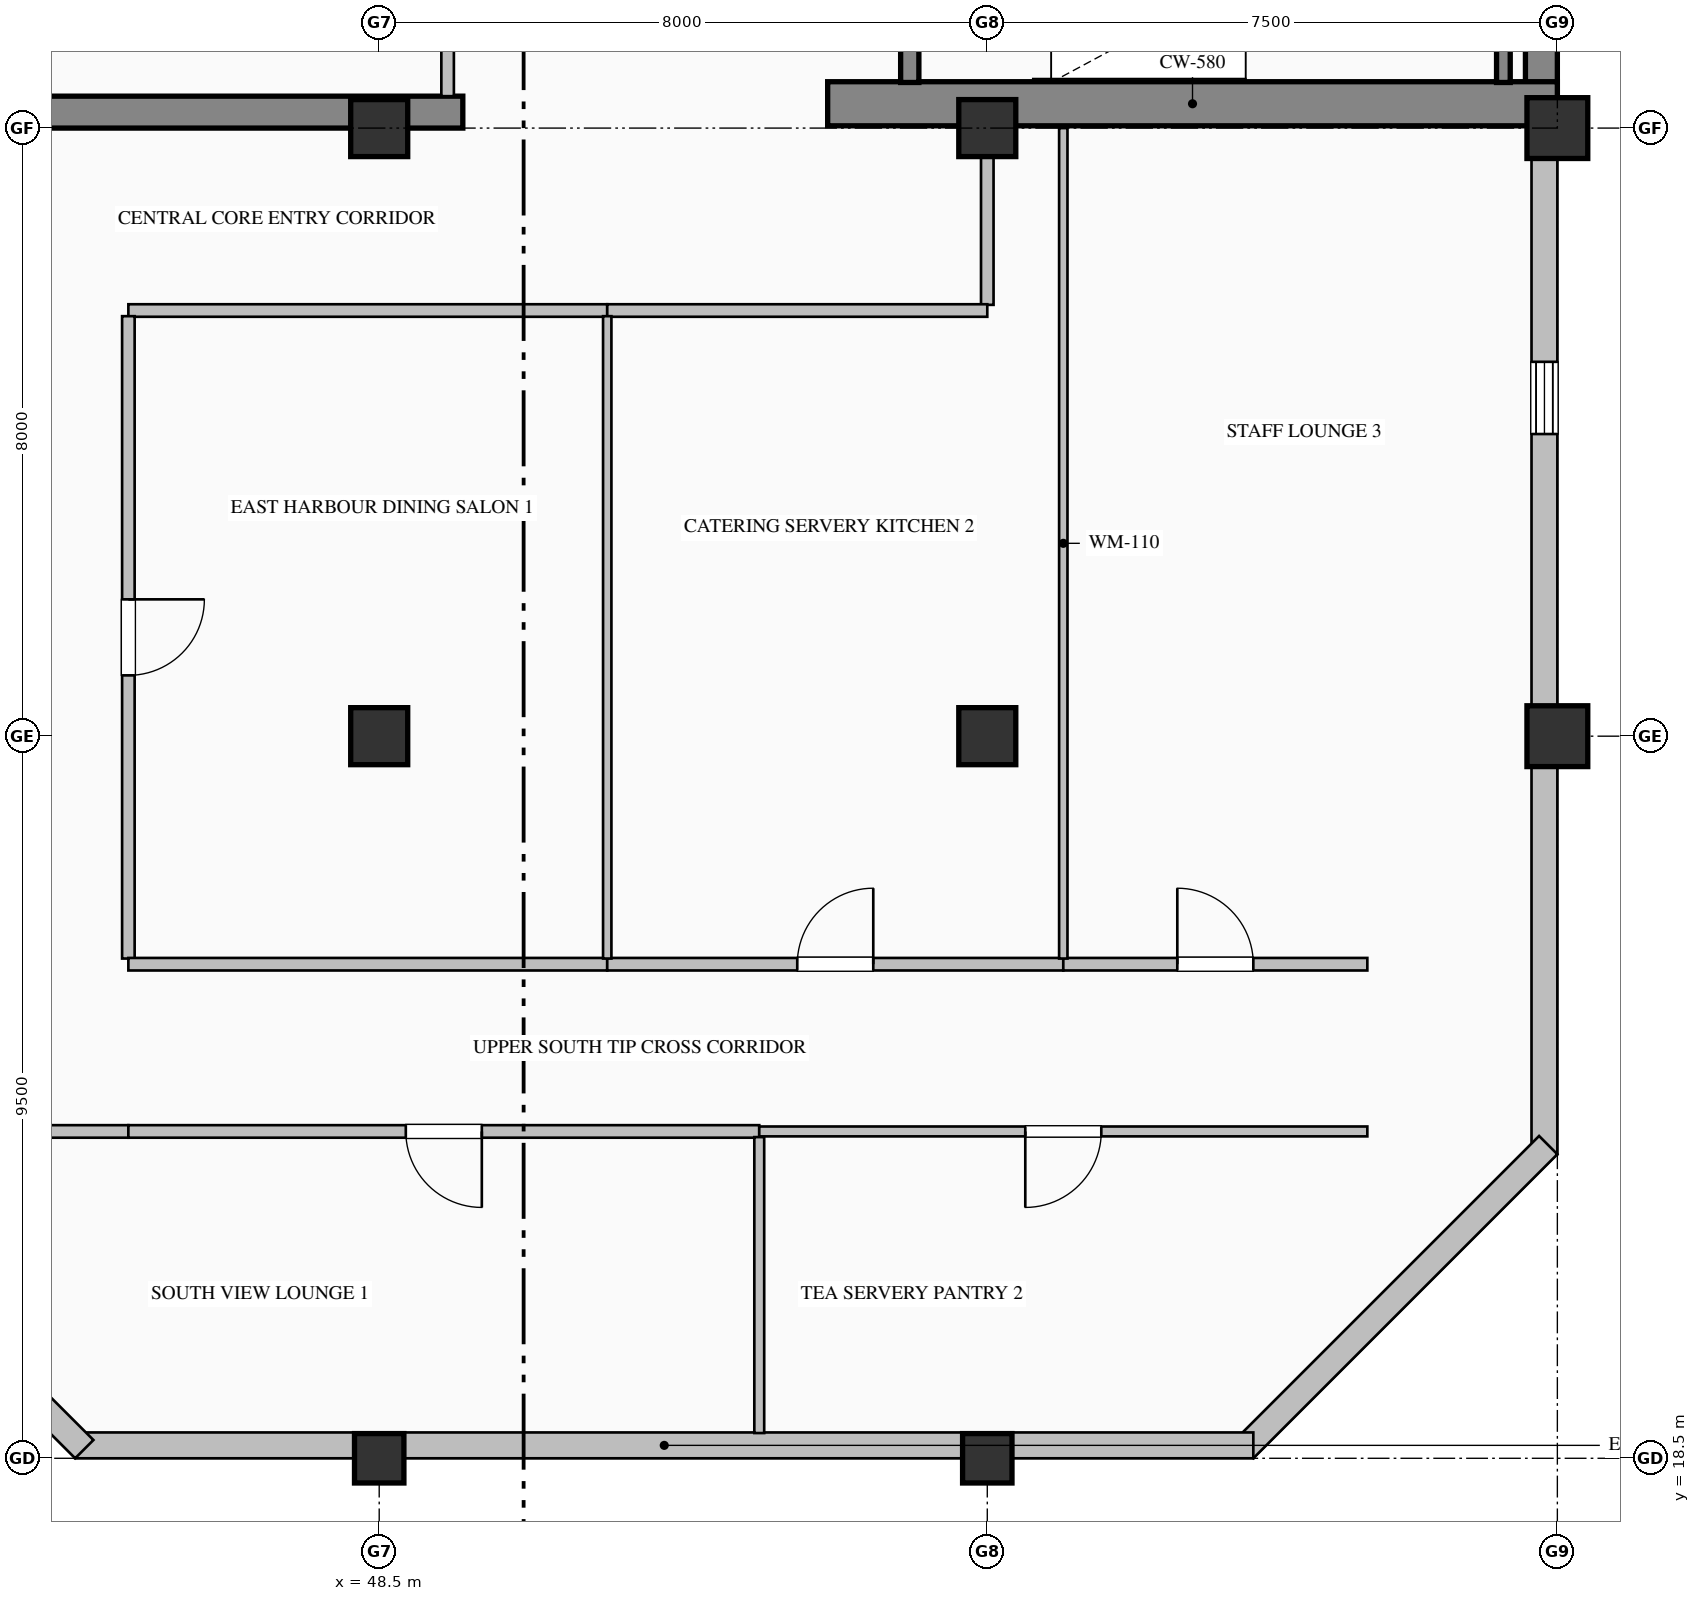
"""IFC4 building model, lengths in metres.
Left out: names, types, materials, properties, quantities, classifications, styles, units other than length and angle.
Written with IfcOpenShell. Run it as: python <this file> out.ifc"""

import sys

from ifc_helpers import new_model, si_unit, direction, frame, frame_2d, origin, origin_2d, place, context, subcontext, project, spatial, rectangle, hollow_rectangle, extrude, element, fill, save


model = new_model("IFC4")
c1 = context("Model", 3, precision=1e-05, world=origin(), true_north=direction((0.0, 1.0)))
c2 = subcontext(c1, "Body", "Model", "MODEL_VIEW")
j1 = project(units=[si_unit("LENGTHUNIT", "METRE"), si_unit("PLANEANGLEUNIT", "RADIAN")], contexts=[c1])
p1 = place(None, origin())
s1 = spatial("IfcSite", under=j1, at=p1, CompositionType="ELEMENT")
p2 = place(p1, origin())
s2 = spatial("IfcBuilding", under=s1, at=p2, CompositionType="ELEMENT")
p3 = place(p2, frame((0.0, 0.0, 335.2)))
s3 = spatial("IfcBuildingStorey", under=s2, at=p3, CompositionType="ELEMENT", Elevation=335.2)
p4 = place(p3, frame((63.79, 36.32, 0.0), z_axis=(0.0, 0.0, 1.0), x_axis=(0.0, 1.0, 0.0)))
e1 = element("IfcWall", 1, at=p4, inside=s3, PredefinedType="SHEAR", context=c2, shape_type="SweptSolid", body=[
    extrude(rectangle(XDim=15.26, YDim=0.42, at=frame_2d((7.63, 0.0))), origin(), (0.0, 0.0, 1.0), 3.785),
])
p5 = place(p3, frame((40.5, 36.21, 0.0), z_axis=(0.0, 0.0, 1.0), x_axis=(1.0, 0.0, 0.0)))
e2 = element("IfcWall", 2, at=p5, inside=s3, PredefinedType="SHEAR", context=c2, shape_type="SweptSolid", body=[
    extrude(rectangle(XDim=9.1, YDim=0.42, at=frame_2d((4.55, 0.0))), origin(), (0.0, 0.0, 1.0), 3.785),
])
p6 = place(p3, frame((54.4, 36.32, 0.0), z_axis=(0.0, 0.0, 1.0), x_axis=(1.0, 0.0, 0.0)))
e3 = element("IfcWall", 3, at=p6, inside=s3, PredefinedType="SHEAR", context=c2, shape_type="SweptSolid", body=[
    extrude(rectangle(XDim=9.6, YDim=0.58, at=frame_2d((4.8, 0.0))), origin(), (0.0, 0.0, 1.0), 4.0),
])
p7 = place(p3, frame((48.5, 18.5, 0.0), z_axis=(0.0, 0.0, 1.0), x_axis=(1.0, 0.0, 0.0)))
e4 = element("IfcColumn", 4, at=p7, inside=s3, PredefinedType="COLUMN", context=c2, shape_type="SweptSolid", body=[
    extrude(hollow_rectangle(XDim=0.65, YDim=0.65, WallThickness=0.028, at=origin_2d()), origin(), (0.0, 0.0, 1.0), 4.0),
])
for number, where, z_axis, x_axis in (
    (5, (48.5, 28.0, 0.0), (0.0, 0.0, 1.0), (1.0, 0.0, 0.0)),
    (6, (48.5, 36.0, 0.0), (0.0, 0.0, 1.0), (1.0, 0.0, 0.0)),
):
    element("IfcColumn", number, at=place(p3, frame(where, z_axis=z_axis, x_axis=x_axis)), inside=s3, PredefinedType="COLUMN", context=c2, shape_type="SweptSolid", body=[
        extrude(rectangle(XDim=0.75, YDim=0.75, at=origin_2d()), origin(), (0.0, 0.0, 1.0), 4.0),
    ])
p8 = place(p3, frame((56.5, 18.5, 0.0), z_axis=(0.0, 0.0, 1.0), x_axis=(1.0, 0.0, 0.0)))
e7 = element("IfcColumn", 7, at=p8, inside=s3, PredefinedType="COLUMN", context=c2, shape_type="SweptSolid", body=[
    extrude(hollow_rectangle(XDim=0.65, YDim=0.65, WallThickness=0.028, at=origin_2d()), origin(), (0.0, 0.0, 1.0), 4.0),
])
for number, where, z_axis, x_axis in (
    (8, (56.5, 28.0, 0.0), (0.0, 0.0, 1.0), (1.0, 0.0, 0.0)),
    (9, (56.5, 36.0, 0.0), (0.0, 0.0, 1.0), (1.0, 0.0, 0.0)),
):
    element("IfcColumn", number, at=place(p3, frame(where, z_axis=z_axis, x_axis=x_axis)), inside=s3, PredefinedType="COLUMN", context=c2, shape_type="SweptSolid", body=[
        extrude(rectangle(XDim=0.75, YDim=0.75, at=origin_2d()), origin(), (0.0, 0.0, 1.0), 4.0),
    ])
for number, where, z_axis, x_axis in (
    (10, (64.0, 28.0, 0.0), (0.0, 0.0, 1.0), (1.0, 0.0, 0.0)),
    (11, (64.0, 36.0, 0.0), (0.0, 0.0, 1.0), (1.0, 0.0, 0.0)),
):
    element("IfcColumn", number, at=place(p3, frame(where, z_axis=z_axis, x_axis=x_axis)), inside=s3, PredefinedType="COLUMN", context=c2, shape_type="SweptSolid", body=[
        extrude(hollow_rectangle(XDim=0.8, YDim=0.8, WallThickness=0.032, at=origin_2d()), origin(), (0.0, 0.0, 1.0), 4.0),
    ])
p9 = place(p3, frame((63.83, 36.05, 0.0), z_axis=(0.0, 0.0, 1.0), x_axis=(0.0, -1.0, 0.0)))
e12 = element("IfcWall", 12, at=p9, inside=s3, PredefinedType="SOLIDWALL", context=c2, shape_type="SweptSolid", body=[
    extrude(rectangle(XDim=13.55, YDim=0.34, at=frame_2d((6.775, 0.0))), origin(), (0.0, 0.0, 1.0), 3.335),
])
p10 = place(p9, frame((3.125, 0.0, 0.9)))
e13 = element("IfcOpeningElement", 13, at=p10, cuts=e12, PredefinedType="OPENING", context=c2, shape_type="SweptSolid", body=[
    extrude(rectangle(XDim=0.95, YDim=1.85, at=frame_2d((0.475, 0.925))), frame((0.0, 0.18, 0.0), z_axis=(0.0, -1.0, 0.0), x_axis=(1.0, 0.0, 0.0)), (0.0, 0.0, 1.0), 0.36),
])
p11 = place(p3, frame((63.88, 22.62, 0.0), z_axis=(0.0, 0.0, 1.0), x_axis=(-0.707106781187, -0.707106781187, 0.0)))
e14 = element("IfcWall", 14, at=p11, inside=s3, PredefinedType="SOLIDWALL", context=c2, shape_type="SweptSolid", body=[
    extrude(rectangle(XDim=5.657, YDim=0.34, at=frame_2d((2.828, 0.0))), origin(), (0.0, 0.0, 1.0), 3.785),
])
p12 = place(p3, frame((60.0, 18.67, 0.0), z_axis=(0.0, 0.0, 1.0), x_axis=(-1.0, 0.0, 0.0)))
e15 = element("IfcWall", 15, at=p12, inside=s3, PredefinedType="SOLIDWALL", context=c2, shape_type="SweptSolid", body=[
    extrude(rectangle(XDim=15.5, YDim=0.34, at=frame_2d((7.75, 0.0))), origin(), (0.0, 0.0, 1.0), 3.335),
])
p13 = place(p3, frame((44.62, 18.62, 0.0), z_axis=(0.0, 0.0, 1.0), x_axis=(-0.707106781187, 0.707106781187, 0.0)))
e16 = element("IfcWall", 16, at=p13, inside=s3, PredefinedType="SOLIDWALL", context=c2, shape_type="SweptSolid", body=[
    extrude(rectangle(XDim=5.657, YDim=0.34, at=frame_2d((2.828, 0.0))), origin(), (0.0, 0.0, 1.0), 3.785),
])
p14 = place(p3, frame((55.48, 39.75, 0.0), z_axis=(0.0, 0.0, 1.0), x_axis=(0.0, -1.0, 0.0)))
e17 = element("IfcWall", 17, at=p14, inside=s3, PredefinedType="SOLIDWALL", context=c2, shape_type="SweptSolid", body=[
    extrude(rectangle(XDim=3.15, YDim=0.24, at=frame_2d((1.575, 0.0))), origin(), (0.0, 0.0, 1.0), 4.0),
])
p15 = place(p14, frame((1.0, 0.0, 0.0)))
e18 = element("IfcOpeningElement", 18, at=p15, cuts=e17, PredefinedType="OPENING", context=c2, shape_type="SweptSolid", body=[
    extrude(rectangle(XDim=1.15, YDim=2.2, at=frame_2d((0.575, 1.1))), frame((0.0, 0.13, 0.0), z_axis=(0.0, -1.0, 0.0), x_axis=(1.0, 0.0, 0.0)), (0.0, 0.0, 1.0), 0.26),
])
p16 = place(p3, frame((63.29, 36.6, 0.0), z_axis=(0.0, 0.0, 1.0), x_axis=(0.0, 1.0, 0.0)))
e19 = element("IfcWall", 19, at=p16, inside=s3, PredefinedType="SOLIDWALL", context=c2, shape_type="SweptSolid", body=[
    extrude(rectangle(XDim=3.15, YDim=0.18, at=frame_2d((1.575, 0.0))), origin(), (0.0, 0.0, 1.0), 4.0),
])
p17 = place(p3, frame((49.4, 36.42, 0.0), z_axis=(0.0, 0.0, 1.0), x_axis=(0.0, 1.0, 0.0)))
e20 = element("IfcWall", 20, at=p17, inside=s3, PredefinedType="PARTITIONING", context=c2, shape_type="SweptSolid", body=[
    extrude(rectangle(XDim=3.893, YDim=0.165, at=frame_2d((1.947, 0.0))), origin(), (0.0, 0.0, 1.0), 3.027),
])
p18 = place(p17, frame((1.497, 0.0, 0.0)))
e21 = element("IfcOpeningElement", 21, at=p18, cuts=e20, PredefinedType="OPENING", context=c2, shape_type="SweptSolid", body=[
    extrude(rectangle(XDim=0.9, YDim=2.15, at=frame_2d((0.45, 1.075))), frame((0.0, 0.093, 0.0), z_axis=(0.0, -1.0, 0.0), x_axis=(1.0, 0.0, 0.0)), (0.0, 0.0, 1.0), 0.185),
])
p19 = place(p3, frame((51.5, 33.6, 0.0), z_axis=(0.0, 0.0, 1.0), x_axis=(-1.0, 0.0, 0.0)))
e22 = element("IfcWall", 22, at=p19, inside=s3, PredefinedType="PARTITIONING", context=c2, shape_type="SweptSolid", body=[
    extrude(rectangle(XDim=6.3, YDim=0.165, at=frame_2d((3.15, 0.0))), origin(), (0.0, 0.0, 1.0), 3.785),
])
p20 = place(p3, frame((56.5, 36.0, 0.0), z_axis=(0.0, 0.0, 1.0), x_axis=(0.0, -1.0, 0.0)))
e23 = element("IfcWall", 23, at=p20, inside=s3, PredefinedType="PARTITIONING", context=c2, shape_type="SweptSolid", body=[
    extrude(rectangle(XDim=2.325, YDim=0.165, at=frame_2d((1.163, 0.0))), origin(), (0.0, 0.0, 1.0), 3.177),
])
p21 = place(p3, frame((56.5, 33.6, 0.0), z_axis=(0.0, 0.0, 1.0), x_axis=(-1.0, 0.0, 0.0)))
e24 = element("IfcWall", 24, at=p21, inside=s3, PredefinedType="PARTITIONING", context=c2, shape_type="SweptSolid", body=[
    extrude(rectangle(XDim=5.0, YDim=0.165, at=frame_2d((2.5, 0.0))), origin(), (0.0, 0.0, 1.0), 3.785),
])
p22 = place(p3, frame((45.2, 33.525, 0.0), z_axis=(0.0, 0.0, 1.0), x_axis=(0.0, -1.0, 0.0)))
e25 = element("IfcWall", 25, at=p22, inside=s3, PredefinedType="PARTITIONING", context=c2, shape_type="SweptSolid", body=[
    extrude(rectangle(XDim=8.451, YDim=0.165, at=frame_2d((4.226, 0.0))), origin(), (0.0, 0.0, 1.0), 3.785),
])
p23 = place(p22, frame((3.726, 0.0, 0.0)))
e26 = element("IfcOpeningElement", 26, at=p23, cuts=e25, PredefinedType="OPENING", context=c2, shape_type="SweptSolid", body=[
    extrude(rectangle(XDim=1.0, YDim=2.15, at=frame_2d((0.5, 1.075))), frame((0.0, 0.093, 0.0), z_axis=(0.0, -1.0, 0.0), x_axis=(1.0, 0.0, 0.0)), (0.0, 0.0, 1.0), 0.185),
])
p24 = place(p3, frame((45.2, 22.8, 0.0), z_axis=(0.0, 0.0, 1.0), x_axis=(-1.0, 0.0, 0.0)))
e27 = element("IfcWall", 27, at=p24, inside=s3, PredefinedType="PARTITIONING", context=c2, shape_type="SweptSolid", body=[
    extrude(rectangle(XDim=2.2, YDim=0.165, at=frame_2d((1.1, 0.0))), origin(), (0.0, 0.0, 1.0), 3.785),
])
p25 = place(p3, frame((45.2, 25.0, 0.0), z_axis=(0.0, 0.0, 1.0), x_axis=(1.0, 0.0, 0.0)))
e28 = element("IfcWall", 28, at=p25, inside=s3, PredefinedType="PARTITIONING", context=c2, shape_type="SweptSolid", body=[
    extrude(rectangle(XDim=6.3, YDim=0.165, at=frame_2d((3.15, 0.0))), origin(), (0.0, 0.0, 1.0), 3.785),
])
p26 = place(p3, frame((51.5, 25.0, 0.0), z_axis=(0.0, 0.0, 1.0), x_axis=(1.0, 0.0, 0.0)))
e29 = element("IfcWall", 29, at=p26, inside=s3, PredefinedType="PARTITIONING", context=c2, shape_type="SweptSolid", body=[
    extrude(rectangle(XDim=6.0, YDim=0.165, at=frame_2d((3.0, 0.0))), origin(), (0.0, 0.0, 1.0), 3.785),
])
p27 = place(p26, frame((2.5, 0.0, 0.0)))
e30 = element("IfcOpeningElement", 30, at=p27, cuts=e29, PredefinedType="OPENING", context=c2, shape_type="SweptSolid", body=[
    extrude(rectangle(XDim=1.0, YDim=2.15, at=frame_2d((0.5, 1.075))), frame((0.0, 0.093, 0.0), z_axis=(0.0, -1.0, 0.0), x_axis=(1.0, 0.0, 0.0)), (0.0, 0.0, 1.0), 0.185),
])
p28 = place(p3, frame((57.5, 25.0, 0.0), z_axis=(0.0, 0.0, 1.0), x_axis=(1.0, 0.0, 0.0)))
e31 = element("IfcWall", 31, at=p28, inside=s3, PredefinedType="PARTITIONING", context=c2, shape_type="SweptSolid", body=[
    extrude(rectangle(XDim=4.0, YDim=0.165, at=frame_2d((2.0, 0.0))), origin(), (0.0, 0.0, 1.0), 3.785),
])
p29 = place(p28, frame((1.5, 0.0, 0.0)))
e32 = element("IfcOpeningElement", 32, at=p29, cuts=e31, PredefinedType="OPENING", context=c2, shape_type="SweptSolid", body=[
    extrude(rectangle(XDim=1.0, YDim=2.15, at=frame_2d((0.5, 1.075))), frame((0.0, 0.093, 0.0), z_axis=(0.0, -1.0, 0.0), x_axis=(1.0, 0.0, 0.0)), (0.0, 0.0, 1.0), 0.185),
])
p30 = place(p3, frame((53.5, 22.8, 0.0), z_axis=(0.0, 0.0, 1.0), x_axis=(-1.0, 0.0, 0.0)))
e33 = element("IfcWall", 33, at=p30, inside=s3, PredefinedType="PARTITIONING", context=c2, shape_type="SweptSolid", body=[
    extrude(rectangle(XDim=8.3, YDim=0.165, at=frame_2d((4.15, 0.0))), origin(), (0.0, 0.0, 1.0), 3.785),
])
p31 = place(p30, frame((3.65, 0.0, 0.0)))
e34 = element("IfcOpeningElement", 34, at=p31, cuts=e33, PredefinedType="OPENING", context=c2, shape_type="SweptSolid", body=[
    extrude(rectangle(XDim=1.0, YDim=2.15, at=frame_2d((0.5, 1.075))), frame((0.0, 0.093, 0.0), z_axis=(0.0, -1.0, 0.0), x_axis=(1.0, 0.0, 0.0)), (0.0, 0.0, 1.0), 0.185),
])
p32 = place(p3, frame((61.5, 22.8, 0.0), z_axis=(0.0, 0.0, 1.0), x_axis=(-1.0, 0.0, 0.0)))
e35 = element("IfcWall", 35, at=p32, inside=s3, PredefinedType="PARTITIONING", context=c2, shape_type="SweptSolid", body=[
    extrude(rectangle(XDim=8.0, YDim=0.13, at=frame_2d((4.0, 0.0))), origin(), (0.0, 0.0, 1.0), 3.785),
])
p33 = place(p32, frame((3.5, 0.0, 0.0)))
e36 = element("IfcOpeningElement", 36, at=p33, cuts=e35, PredefinedType="OPENING", context=c2, shape_type="SweptSolid", body=[
    extrude(rectangle(XDim=1.0, YDim=2.15, at=frame_2d((0.5, 1.075))), frame((0.0, 0.075, 0.0), z_axis=(0.0, -1.0, 0.0), x_axis=(1.0, 0.0, 0.0)), (0.0, 0.0, 1.0), 0.15),
])
p34 = place(p3, frame((51.5, 33.525, 0.0), z_axis=(0.0, 0.0, 1.0), x_axis=(0.0, -1.0, 0.0)))
e37 = element("IfcWall", 37, at=p34, inside=s3, PredefinedType="MOVABLE", context=c2, shape_type="SweptSolid", body=[
    extrude(rectangle(XDim=8.451, YDim=0.11, at=frame_2d((4.226, 0.0))), origin(), (0.0, 0.0, 1.0), 3.785),
])
p35 = place(p3, frame((57.5, 36.0, 0.0), z_axis=(0.0, 0.0, 1.0), x_axis=(0.0, -1.0, 0.0)))
e38 = element("IfcWall", 38, at=p35, inside=s3, PredefinedType="MOVABLE", context=c2, shape_type="SweptSolid", body=[
    extrude(rectangle(XDim=10.926, YDim=0.11, at=frame_2d((5.463, 0.0))), origin(), (0.0, 0.0, 1.0), 3.785),
])
p36 = place(p3, frame((53.5, 22.726, 0.0), z_axis=(0.0, 0.0, 1.0), x_axis=(0.0, -1.0, 0.0)))
e39 = element("IfcWall", 39, at=p36, inside=s3, PredefinedType="PARTITIONING", context=c2, shape_type="SweptSolid", body=[
    extrude(rectangle(XDim=3.894, YDim=0.13, at=frame_2d((1.947, 0.0))), origin(), (0.0, 0.0, 1.0), 3.785),
])
p37 = place(p10, origin())
e40 = element("IfcWindow", 40, at=p37, inside=s3, PartitioningType="SINGLE_PANEL", PredefinedType="WINDOW", context=c2, shape_type="SweptSolid", body=[
    extrude(rectangle(XDim=0.95, YDim=1.85, at=frame_2d((0.475, 0.925))), frame((0.0, 0.15, 0.0), z_axis=(0.0, -1.0, 0.0), x_axis=(1.0, 0.0, 0.0)), (0.0, 0.0, 1.0), 0.06),
])
fill(e13, e40)
p38 = place(p23, origin())
e41 = element("IfcDoor", 41, at=p38, inside=s3, OperationType="SINGLE_SWING_LEFT", PredefinedType="DOOR", context=c2, shape_type="SweptSolid", body=[
    extrude(rectangle(XDim=1.0, YDim=2.15, at=frame_2d((0.5, 1.075))), frame((0.0, 0.025, 0.0), z_axis=(0.0, -1.0, 0.0), x_axis=(1.0, 0.0, 0.0)), (0.0, 0.0, 1.0), 0.05),
])
fill(e26, e41)
p39 = place(p27, origin())
e42 = element("IfcDoor", 42, at=p39, inside=s3, OperationType="SINGLE_SWING_RIGHT", PredefinedType="DOOR", context=c2, shape_type="SweptSolid", body=[
    extrude(rectangle(XDim=1.0, YDim=2.15, at=frame_2d((0.5, 1.075))), frame((0.0, 0.025, 0.0), z_axis=(0.0, -1.0, 0.0), x_axis=(1.0, 0.0, 0.0)), (0.0, 0.0, 1.0), 0.05),
])
fill(e30, e42)
p40 = place(p29, origin())
e43 = element("IfcDoor", 43, at=p40, inside=s3, OperationType="SINGLE_SWING_LEFT", PredefinedType="DOOR", context=c2, shape_type="SweptSolid", body=[
    extrude(rectangle(XDim=1.0, YDim=2.15, at=frame_2d((0.5, 1.075))), frame((0.0, 0.025, 0.0), z_axis=(0.0, -1.0, 0.0), x_axis=(1.0, 0.0, 0.0)), (0.0, 0.0, 1.0), 0.05),
])
fill(e32, e43)
p41 = place(p31, origin())
e44 = element("IfcDoor", 44, at=p41, inside=s3, OperationType="SINGLE_SWING_LEFT", PredefinedType="DOOR", context=c2, shape_type="SweptSolid", body=[
    extrude(rectangle(XDim=1.0, YDim=2.15, at=frame_2d((0.5, 1.075))), frame((0.0, 0.025, 0.0), z_axis=(0.0, -1.0, 0.0), x_axis=(1.0, 0.0, 0.0)), (0.0, 0.0, 1.0), 0.05),
])
fill(e34, e44)
p42 = place(p33, origin())
e45 = element("IfcDoor", 45, at=p42, inside=s3, OperationType="SINGLE_SWING_RIGHT", PredefinedType="DOOR", context=c2, shape_type="SweptSolid", body=[
    extrude(rectangle(XDim=1.0, YDim=2.15, at=frame_2d((0.5, 1.075))), frame((0.0, 0.025, 0.0), z_axis=(0.0, -1.0, 0.0), x_axis=(1.0, 0.0, 0.0)), (0.0, 0.0, 1.0), 0.05),
])
fill(e36, e45)
save(model, sys.argv[1])
